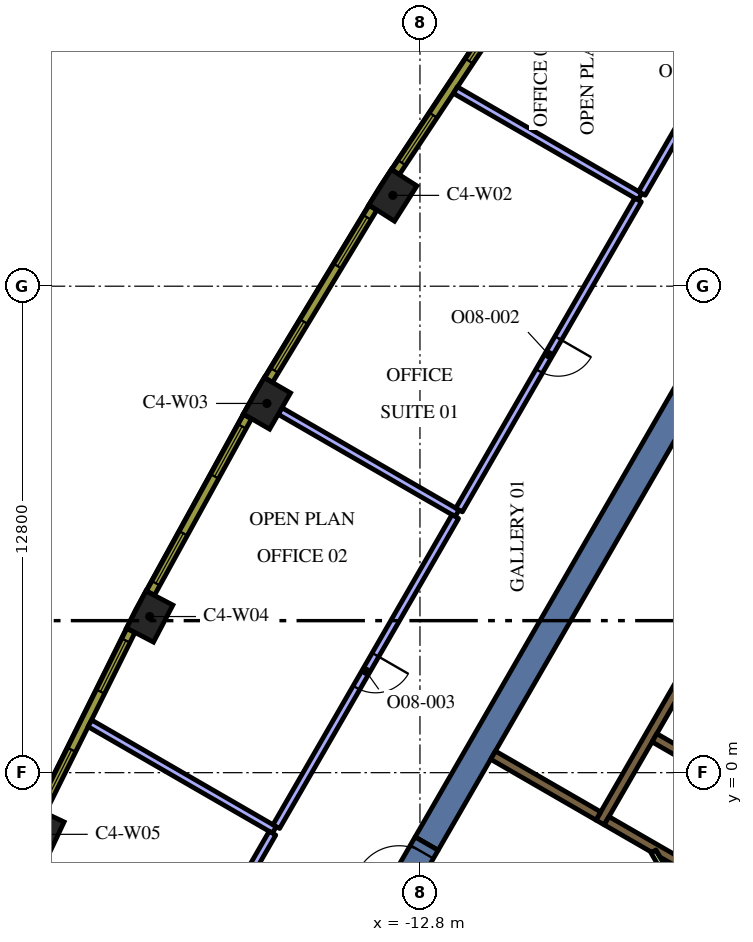
"""IFC4 building model, lengths in metres.
Left out: names, types, materials, properties, quantities, classifications, styles, units other than length and angle.
Written with IfcOpenShell. Run it as: python <this file> out.ifc"""

import sys

from ifc_helpers import new_model, si_unit, direction, frame, frame_2d, origin, origin_2d, place, context, subcontext, project, spatial, polyline, rectangle, outline, extrude, element, fill, save


model = new_model("IFC4")
c1 = context("Model", 3, precision=1e-05, world=origin(), true_north=direction((0.0, 1.0)))
c2 = subcontext(c1, "Body", "Model", "MODEL_VIEW")
j1 = project(units=[si_unit("LENGTHUNIT", "METRE"), si_unit("PLANEANGLEUNIT", "RADIAN")], contexts=[c1])
p1 = place(None, origin())
s1 = spatial("IfcSite", under=j1, at=p1, CompositionType="ELEMENT")
p2 = place(p1, origin())
s2 = spatial("IfcBuilding", under=s1, at=p2, CompositionType="ELEMENT")
p3 = place(p2, frame((0.0, 0.0, 231.0)))
s3 = spatial("IfcBuildingStorey", under=s2, at=p3, CompositionType="ELEMENT", Elevation=231.0)
for number, where, z_axis, x_axis in (
    (1, (-13.513, 15.19, 0.0), (0.0, 0.0, 1.0), (-0.536, -0.845, 0.0)),
    (2, (-16.827, 9.715, 0.0), (0.0, 0.0, 1.0), (-0.5, -0.866, 0.0)),
    (3, (-19.912, 4.108, 0.0), (0.0, 0.0, 1.0), (-0.464, -0.886, 0.0)),
    (4, (-22.76, -1.623, 0.0), (0.0, 0.0, 1.0), (-0.426, -0.905, 0.0)),
):
    element("IfcColumn", number, at=place(p3, frame(where, z_axis=z_axis, x_axis=x_axis)), inside=s3, PredefinedType="COLUMN", context=c2, shape_type="SweptSolid", body=[
        extrude(rectangle(XDim=1.1, YDim=0.8, at=origin_2d()), origin(), (0.0, 0.0, 1.0), 4.2),
    ])
p4 = place(p3, frame((-12.625, -1.867, 0.0), z_axis=(0.0, 0.0, 1.0), x_axis=(0.500008520515, 0.866020484407, 0.0)))
e5 = element("IfcWall", 5, at=p4, inside=s3, PredefinedType="SOLIDWALL", context=c2, shape_type="SweptSolid", body=[
    extrude(rectangle(XDim=15.859, YDim=0.7, at=frame_2d((7.929, 0.0))), origin(), (0.0, 0.0, 1.0), 4.2),
])
p5 = place(p3, frame((-8.06, -1.311, 0.0), z_axis=(0.0, 0.0, 1.0), x_axis=(0.50000273126, 0.866023826885, 0.0)))
e6 = element("IfcWall", 6, at=p5, inside=s3, PredefinedType="SOLIDWALL", context=c2, shape_type="SweptSolid", body=[
    extrude(rectangle(XDim=10.33, YDim=0.25, at=frame_2d((5.165, 0.0))), origin(), (0.0, 0.0, 1.0), 4.2),
])
p6 = place(p3, frame((-4.724, -0.182, 0.0), z_axis=(0.0, 0.0, 1.0), x_axis=(-0.866008176907, 0.50002983664, 0.0)))
e7 = element("IfcWall", 7, at=p6, inside=s3, PredefinedType="SOLIDWALL", context=c2, shape_type="SweptSolid", body=[
    extrude(rectangle(XDim=2.2, YDim=0.25, at=frame_2d((1.1, 0.0))), origin(), (0.0, 0.0, 1.0), 4.2),
])
p7 = place(p3, origin())
e8 = element("IfcWall", 8, at=p7, inside=s3, PredefinedType="SOLIDWALL", context=c2, shape_type="SweptSolid", body=[
    extrude(outline(polyline([(-5.922, -2.257), (-5.922, -2.257), (-5.705, -2.382), (-5.83, -2.598), (-6.483, -2.221), (-6.591, -2.033), (-6.591, -2.033), (-6.7, -2.096), (-7.952, -1.373), (-7.827, -1.156), (-5.922, -2.257)])), origin(), (0.0, 0.0, 1.0), 4.2),
])
p8 = place(p3, frame((-8.106, -1.14, 0.0), z_axis=(0.0, 0.0, 1.0), x_axis=(-0.866008981251, 0.500028443584, 0.0)))
e9 = element("IfcWall", 9, at=p8, inside=s3, PredefinedType="SOLIDWALL", context=c2, shape_type="SweptSolid", body=[
    extrude(rectangle(XDim=3.2, YDim=0.25, at=frame_2d((1.6, 0.0))), origin(), (0.0, 0.0, 1.0), 4.2),
])
p9 = place(p3, frame((-5.606, -3.89, 0.0), z_axis=(0.0, 0.0, 1.0), x_axis=(-0.500027713859, 0.866009402589, 0.0)))
e10 = element("IfcWall", 10, at=p9, inside=s3, PredefinedType="PARTITIONING", context=c2, shape_type="SweptSolid", body=[
    extrude(rectangle(XDim=2.1, YDim=0.15, at=frame_2d((1.05, 0.0))), origin(), (0.0, 0.0, 1.0), 3.45),
])
p10 = place(p9, frame((0.45, 0.0, 0.0)))
e11 = element("IfcOpeningElement", 11, at=p10, cuts=e10, PredefinedType="OPENING", context=c2, shape_type="SweptSolid", body=[
    extrude(rectangle(XDim=1.2, YDim=2.1, at=frame_2d((0.6, 1.05))), frame((0.0, 0.085, 0.0), z_axis=(0.0, -1.0, 0.0), x_axis=(1.0, 0.0, 0.0)), (0.0, 0.0, 1.0), 0.17),
])
p11 = place(p3, frame((-13.475, -3.339, 0.0), z_axis=(0.0, 0.0, 1.0), x_axis=(0.499954529098, 0.86605165483, 0.0)))
e12 = element("IfcWall", 12, at=p11, inside=s3, PredefinedType="SOLIDWALL", context=c2, shape_type="SweptSolid", body=[
    extrude(rectangle(XDim=1.7, YDim=0.7, at=frame_2d((0.85, 0.0))), origin(), (0.0, 0.0, 1.0), 4.2),
])
p12 = place(p11, frame((0.25, 0.0, 0.0)))
e13 = element("IfcOpeningElement", 13, at=p12, cuts=e12, PredefinedType="OPENING", context=c2, shape_type="SweptSolid", body=[
    extrude(rectangle(XDim=1.2, YDim=2.1, at=frame_2d((0.6, 1.05))), frame((0.0, 0.36, 0.0), z_axis=(0.0, -1.0, 0.0), x_axis=(1.0, 0.0, 0.0)), (0.0, 0.0, 1.0), 0.72),
])
p13 = place(p3, frame((-7.011, 15.156, 0.0), z_axis=(0.0, 0.0, 1.0), x_axis=(-0.866015917575, 0.500016430238, 0.0)))
e14 = element("IfcWall", 14, at=p13, inside=s3, PredefinedType="PARTITIONING", context=c2, shape_type="SweptSolid", body=[
    extrude(rectangle(XDim=5.607, YDim=0.2, at=frame_2d((2.804, 0.0))), origin(), (0.0, 0.0, 1.0), 3.45),
])
p14 = place(p3, frame((-6.161, 25.16, 0.0), z_axis=(0.0, 0.0, 1.0), x_axis=(0.414315639321, -0.910133260031, 0.0)))
e15 = element("IfcWall", 15, at=p14, inside=s3, PredefinedType="PARTITIONING", context=c2, shape_type="SweptSolid", body=[
    extrude(rectangle(XDim=7.318, YDim=0.2, at=frame_2d((3.659, 0.0))), origin(), (0.0, 0.0, 1.0), 3.45),
])
p15 = place(p3, frame((-5.836, 17.191, 0.0), z_axis=(0.0, 0.0, 1.0), x_axis=(-0.500048020061, -0.865997677614, 0.0)))
e16 = element("IfcWall", 16, at=p15, inside=s3, PredefinedType="PARTITIONING", context=c2, shape_type="SweptSolid", body=[
    extrude(rectangle(XDim=2.25, YDim=0.2, at=frame_2d((1.125, 0.0))), origin(), (0.0, 0.0, 1.0), 3.45),
])
p16 = place(p3, frame((-11.821, 6.825, 0.0), z_axis=(0.0, 0.0, 1.0), x_axis=(-0.866011792348, 0.500023574959, 0.0)))
e17 = element("IfcWall", 17, at=p16, inside=s3, PredefinedType="PARTITIONING", context=c2, shape_type="SweptSolid", body=[
    extrude(rectangle(XDim=5.381, YDim=0.2, at=frame_2d((2.69, 0.0))), origin(), (0.0, 0.0, 1.0), 3.45),
])
p17 = place(p3, frame((-7.061, 15.069, 0.0), z_axis=(0.0, 0.0, 1.0), x_axis=(-0.500008127286, -0.866020711443, 0.0)))
e18 = element("IfcWall", 18, at=p17, inside=s3, PredefinedType="PARTITIONING", context=c2, shape_type="SweptSolid", body=[
    extrude(rectangle(XDim=9.42, YDim=0.2, at=frame_2d((4.71, 0.0))), origin(), (0.0, 0.0, 1.0), 3.45),
])
p18 = place(p17, frame((4.2, 0.0, 0.0)))
e19 = element("IfcOpeningElement", 19, at=p18, cuts=e18, PredefinedType="OPENING", context=c2, shape_type="SweptSolid", body=[
    extrude(rectangle(XDim=1.0, YDim=2.1, at=frame_2d((0.5, 1.05))), frame((0.0, 0.11, 0.0), z_axis=(0.0, -1.0, 0.0), x_axis=(1.0, 0.0, 0.0)), (0.0, 0.0, 1.0), 0.22),
])
p19 = place(p3, frame((-16.631, -1.506, 0.0), z_axis=(0.0, 0.0, 1.0), x_axis=(-0.866045655253, 0.499964921787, 0.0)))
e20 = element("IfcWall", 20, at=p19, inside=s3, PredefinedType="PARTITIONING", context=c2, shape_type="SweptSolid", body=[
    extrude(rectangle(XDim=5.607, YDim=0.2, at=frame_2d((2.804, 0.0))), origin(), (0.0, 0.0, 1.0), 3.45),
])
p20 = place(p3, frame((-11.871, 6.738, 0.0), z_axis=(0.0, 0.0, 1.0), x_axis=(-0.500019350398, -0.866014231539, 0.0)))
e21 = element("IfcWall", 21, at=p20, inside=s3, PredefinedType="PARTITIONING", context=c2, shape_type="SweptSolid", body=[
    extrude(rectangle(XDim=9.42, YDim=0.2, at=frame_2d((4.71, 0.0))), origin(), (0.0, 0.0, 1.0), 3.45),
])
p21 = place(p20, frame((4.2, 0.0, 0.0)))
e22 = element("IfcOpeningElement", 22, at=p21, cuts=e21, PredefinedType="OPENING", context=c2, shape_type="SweptSolid", body=[
    extrude(rectangle(XDim=1.0, YDim=2.1, at=frame_2d((0.5, 1.05))), frame((0.0, 0.11, 0.0), z_axis=(0.0, -1.0, 0.0), x_axis=(1.0, 0.0, 0.0)), (0.0, 0.0, 1.0), 0.22),
])
p22 = place(p3, frame((-16.681, -1.593, 0.0), z_axis=(0.0, 0.0, 1.0), x_axis=(-0.499985038317, -0.866034041744, 0.0)))
e23 = element("IfcWall", 23, at=p22, inside=s3, PredefinedType="PARTITIONING", context=c2, shape_type="SweptSolid", body=[
    extrude(rectangle(XDim=2.28, YDim=0.2, at=frame_2d((1.14, 0.0))), origin(), (0.0, 0.0, 1.0), 3.45),
])
p23 = place(p3, frame((-10.513, 20.218, 0.0), z_axis=(0.0, 0.0, 1.0), x_axis=(-0.552901821755, -0.833246407433, 0.0)))
e24 = element("IfcWall", 24, at=p23, inside=s3, PredefinedType="SOLIDWALL", context=c2, shape_type="SweptSolid", body=[
    extrude(rectangle(XDim=5.298, YDim=0.24, at=frame_2d((2.649, 0.0))), origin(), (0.0, 0.0, 1.0), 3.95),
])
p24 = place(p23, frame((0.294, 0.0, 0.9)))
e25 = element("IfcOpeningElement", 25, at=p24, cuts=e24, PredefinedType="OPENING", context=c2, shape_type="SweptSolid", body=[
    extrude(rectangle(XDim=1.5, YDim=2.55, at=frame_2d((0.75, 1.275))), frame((0.0, 0.13, 0.0), z_axis=(0.0, -1.0, 0.0), x_axis=(1.0, 0.0, 0.0)), (0.0, 0.0, 1.0), 0.26),
])
p25 = place(p23, frame((3.504, 0.0, 0.9)))
e26 = element("IfcOpeningElement", 26, at=p25, cuts=e24, PredefinedType="OPENING", context=c2, shape_type="SweptSolid", body=[
    extrude(rectangle(XDim=1.5, YDim=2.55, at=frame_2d((0.75, 1.275))), frame((0.0, 0.13, 0.0), z_axis=(0.0, -1.0, 0.0), x_axis=(1.0, 0.0, 0.0)), (0.0, 0.0, 1.0), 0.26),
])
p26 = place(p3, frame((-14.038, 14.864, 0.0), z_axis=(0.0, 0.0, 1.0), x_axis=(-0.517846166225, -0.855473756538, 0.0)))
e27 = element("IfcWall", 27, at=p26, inside=s3, PredefinedType="SOLIDWALL", context=c2, shape_type="SweptSolid", body=[
    extrude(rectangle(XDim=5.298, YDim=0.24, at=frame_2d((2.649, 0.0))), origin(), (0.0, 0.0, 1.0), 3.95),
])
p27 = place(p26, frame((0.294, 0.0, 0.9)))
e28 = element("IfcOpeningElement", 28, at=p27, cuts=e27, PredefinedType="OPENING", context=c2, shape_type="SweptSolid", body=[
    extrude(rectangle(XDim=1.5, YDim=2.55, at=frame_2d((0.75, 1.275))), frame((0.0, 0.13, 0.0), z_axis=(0.0, -1.0, 0.0), x_axis=(1.0, 0.0, 0.0)), (0.0, 0.0, 1.0), 0.26),
])
p28 = place(p26, frame((3.504, 0.0, 0.9)))
e29 = element("IfcOpeningElement", 29, at=p28, cuts=e27, PredefinedType="OPENING", context=c2, shape_type="SweptSolid", body=[
    extrude(rectangle(XDim=1.5, YDim=2.55, at=frame_2d((0.75, 1.275))), frame((0.0, 0.13, 0.0), z_axis=(0.0, -1.0, 0.0), x_axis=(1.0, 0.0, 0.0)), (0.0, 0.0, 1.0), 0.26),
])
p29 = place(p3, frame((-17.338, 9.368, 0.0), z_axis=(0.0, 0.0, 1.0), x_axis=(-0.481925825015, -0.876212017256, 0.0)))
e30 = element("IfcWall", 30, at=p29, inside=s3, PredefinedType="SOLIDWALL", context=c2, shape_type="SweptSolid", body=[
    extrude(rectangle(XDim=5.299, YDim=0.24, at=frame_2d((2.649, 0.0))), origin(), (0.0, 0.0, 1.0), 3.95),
])
p30 = place(p29, frame((0.295, 0.0, 0.9)))
e31 = element("IfcOpeningElement", 31, at=p30, cuts=e30, PredefinedType="OPENING", context=c2, shape_type="SweptSolid", body=[
    extrude(rectangle(XDim=1.5, YDim=2.55, at=frame_2d((0.75, 1.275))), frame((0.0, 0.13, 0.0), z_axis=(0.0, -1.0, 0.0), x_axis=(1.0, 0.0, 0.0)), (0.0, 0.0, 1.0), 0.26),
])
p31 = place(p29, frame((3.504, 0.0, 0.9)))
e32 = element("IfcOpeningElement", 32, at=p31, cuts=e30, PredefinedType="OPENING", context=c2, shape_type="SweptSolid", body=[
    extrude(rectangle(XDim=1.5, YDim=2.55, at=frame_2d((0.75, 1.275))), frame((0.0, 0.13, 0.0), z_axis=(0.0, -1.0, 0.0), x_axis=(1.0, 0.0, 0.0)), (0.0, 0.0, 1.0), 0.26),
])
p32 = place(p3, frame((-20.407, 3.74, 0.0), z_axis=(0.0, 0.0, 1.0), x_axis=(-0.445129582031, -0.895466166419, 0.0)))
e33 = element("IfcWall", 33, at=p32, inside=s3, PredefinedType="SOLIDWALL", context=c2, shape_type="SweptSolid", body=[
    extrude(rectangle(XDim=5.298, YDim=0.24, at=frame_2d((2.649, 0.0))), origin(), (0.0, 0.0, 1.0), 3.95),
])
p33 = place(p32, frame((0.295, 0.0, 0.9)))
e34 = element("IfcOpeningElement", 34, at=p33, cuts=e33, PredefinedType="OPENING", context=c2, shape_type="SweptSolid", body=[
    extrude(rectangle(XDim=1.5, YDim=2.55, at=frame_2d((0.75, 1.275))), frame((0.0, 0.13, 0.0), z_axis=(0.0, -1.0, 0.0), x_axis=(1.0, 0.0, 0.0)), (0.0, 0.0, 1.0), 0.26),
])
p34 = place(p32, frame((3.504, 0.0, 0.9)))
e35 = element("IfcOpeningElement", 35, at=p34, cuts=e33, PredefinedType="OPENING", context=c2, shape_type="SweptSolid", body=[
    extrude(rectangle(XDim=1.5, YDim=2.55, at=frame_2d((0.75, 1.275))), frame((0.0, 0.13, 0.0), z_axis=(0.0, -1.0, 0.0), x_axis=(1.0, 0.0, 0.0)), (0.0, 0.0, 1.0), 0.26),
])
p35 = place(p12, origin())
e36 = element("IfcDoor", 36, at=p35, inside=s3, OperationType="SINGLE_SWING_LEFT", PredefinedType="DOOR", context=c2, shape_type="SweptSolid", body=[
    extrude(rectangle(XDim=1.2, YDim=2.1, at=frame_2d((0.6, 1.05))), frame((0.0, 0.025, 0.0), z_axis=(0.0, -1.0, 0.0), x_axis=(1.0, 0.0, 0.0)), (0.0, 0.0, 1.0), 0.05),
])
fill(e13, e36)
p36 = place(p18, origin())
e37 = element("IfcDoor", 37, at=p36, inside=s3, OperationType="SINGLE_SWING_LEFT", PredefinedType="DOOR", context=c2, shape_type="SweptSolid", body=[
    extrude(rectangle(XDim=1.0, YDim=2.1, at=frame_2d((0.5, 1.05))), frame((0.0, 0.025, 0.0), z_axis=(0.0, -1.0, 0.0), x_axis=(1.0, 0.0, 0.0)), (0.0, 0.0, 1.0), 0.05),
])
fill(e19, e37)
p37 = place(p21, origin())
e38 = element("IfcDoor", 38, at=p37, inside=s3, OperationType="SINGLE_SWING_LEFT", PredefinedType="DOOR", context=c2, shape_type="SweptSolid", body=[
    extrude(rectangle(XDim=1.0, YDim=2.1, at=frame_2d((0.5, 1.05))), frame((0.0, 0.025, 0.0), z_axis=(0.0, -1.0, 0.0), x_axis=(1.0, 0.0, 0.0)), (0.0, 0.0, 1.0), 0.05),
])
fill(e22, e38)
p38 = place(p24, origin())
e39 = element("IfcWindow", 39, at=p38, inside=s3, PartitioningType="SINGLE_PANEL", PredefinedType="WINDOW", context=c2, shape_type="SweptSolid", body=[
    extrude(rectangle(XDim=1.5, YDim=2.55, at=frame_2d((0.75, 1.275))), frame((0.0, 0.04, 0.0), z_axis=(0.0, -1.0, 0.0), x_axis=(1.0, 0.0, 0.0)), (0.0, 0.0, 1.0), 0.06),
])
fill(e25, e39)
p39 = place(p25, origin())
e40 = element("IfcWindow", 40, at=p39, inside=s3, PartitioningType="SINGLE_PANEL", PredefinedType="WINDOW", context=c2, shape_type="SweptSolid", body=[
    extrude(rectangle(XDim=1.5, YDim=2.55, at=frame_2d((0.75, 1.275))), frame((0.0, 0.04, 0.0), z_axis=(0.0, -1.0, 0.0), x_axis=(1.0, 0.0, 0.0)), (0.0, 0.0, 1.0), 0.06),
])
fill(e26, e40)
p40 = place(p27, origin())
e41 = element("IfcWindow", 41, at=p40, inside=s3, PartitioningType="SINGLE_PANEL", PredefinedType="WINDOW", context=c2, shape_type="SweptSolid", body=[
    extrude(rectangle(XDim=1.5, YDim=2.55, at=frame_2d((0.75, 1.275))), frame((0.0, 0.04, 0.0), z_axis=(0.0, -1.0, 0.0), x_axis=(1.0, 0.0, 0.0)), (0.0, 0.0, 1.0), 0.06),
])
fill(e28, e41)
p41 = place(p28, origin())
e42 = element("IfcWindow", 42, at=p41, inside=s3, PartitioningType="SINGLE_PANEL", PredefinedType="WINDOW", context=c2, shape_type="SweptSolid", body=[
    extrude(rectangle(XDim=1.5, YDim=2.55, at=frame_2d((0.75, 1.275))), frame((0.0, 0.04, 0.0), z_axis=(0.0, -1.0, 0.0), x_axis=(1.0, 0.0, 0.0)), (0.0, 0.0, 1.0), 0.06),
])
fill(e29, e42)
p42 = place(p30, origin())
e43 = element("IfcWindow", 43, at=p42, inside=s3, PartitioningType="SINGLE_PANEL", PredefinedType="WINDOW", context=c2, shape_type="SweptSolid", body=[
    extrude(rectangle(XDim=1.5, YDim=2.55, at=frame_2d((0.75, 1.275))), frame((0.0, 0.04, 0.0), z_axis=(0.0, -1.0, 0.0), x_axis=(1.0, 0.0, 0.0)), (0.0, 0.0, 1.0), 0.06),
])
fill(e31, e43)
p43 = place(p31, origin())
e44 = element("IfcWindow", 44, at=p43, inside=s3, PartitioningType="SINGLE_PANEL", PredefinedType="WINDOW", context=c2, shape_type="SweptSolid", body=[
    extrude(rectangle(XDim=1.5, YDim=2.55, at=frame_2d((0.75, 1.275))), frame((0.0, 0.04, 0.0), z_axis=(0.0, -1.0, 0.0), x_axis=(1.0, 0.0, 0.0)), (0.0, 0.0, 1.0), 0.06),
])
fill(e32, e44)
p44 = place(p33, origin())
e45 = element("IfcWindow", 45, at=p44, inside=s3, PartitioningType="SINGLE_PANEL", PredefinedType="WINDOW", context=c2, shape_type="SweptSolid", body=[
    extrude(rectangle(XDim=1.5, YDim=2.55, at=frame_2d((0.75, 1.275))), frame((0.0, 0.04, 0.0), z_axis=(0.0, -1.0, 0.0), x_axis=(1.0, 0.0, 0.0)), (0.0, 0.0, 1.0), 0.06),
])
fill(e34, e45)
p45 = place(p34, origin())
e46 = element("IfcWindow", 46, at=p45, inside=s3, PartitioningType="SINGLE_PANEL", PredefinedType="WINDOW", context=c2, shape_type="SweptSolid", body=[
    extrude(rectangle(XDim=1.5, YDim=2.55, at=frame_2d((0.75, 1.275))), frame((0.0, 0.04, 0.0), z_axis=(0.0, -1.0, 0.0), x_axis=(1.0, 0.0, 0.0)), (0.0, 0.0, 1.0), 0.06),
])
fill(e35, e46)
save(model, sys.argv[1])
